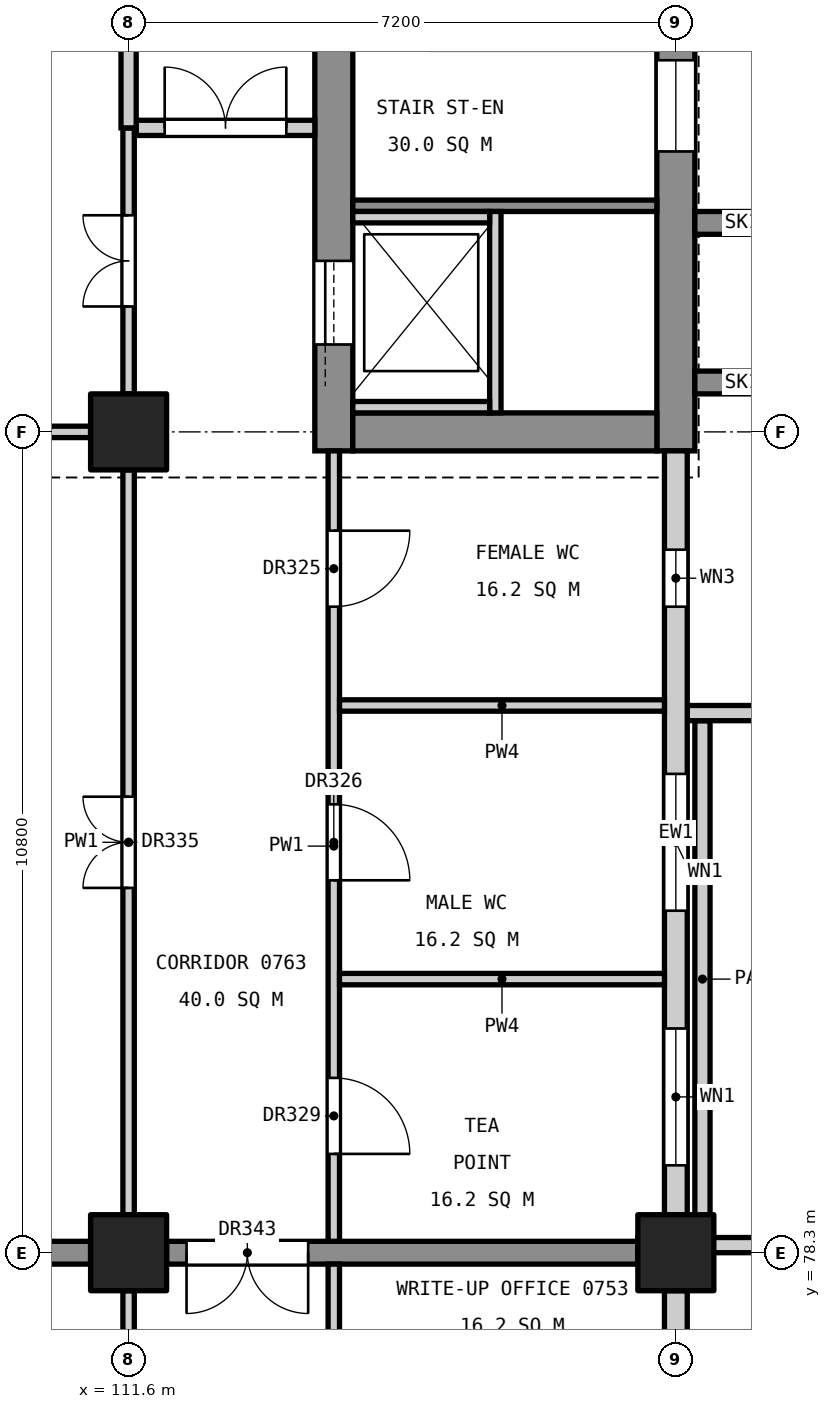
"""IFC4 building model, lengths in metres.
Left out: names, types, materials, properties, quantities, classifications, styles, units other than length and angle.
Written with IfcOpenShell. Run it as: python <this file> out.ifc"""

import sys

from ifc_helpers import new_model, si_unit, direction, frame, frame_2d, origin, origin_2d, place, context, subcontext, project, spatial, rectangle, extrude, element, fill, save


model = new_model("IFC4")
c1 = context("Model", 3, precision=1e-05, world=origin(), true_north=direction((0.0, 1.0)))
c2 = subcontext(c1, "Body", "Model", "MODEL_VIEW")
j1 = project(units=[si_unit("LENGTHUNIT", "METRE"), si_unit("PLANEANGLEUNIT", "RADIAN")], contexts=[c1])
p1 = place(None, origin())
s1 = spatial("IfcSite", under=j1, at=p1, CompositionType="ELEMENT")
p2 = place(p1, origin())
s2 = spatial("IfcBuilding", under=s1, at=p2, CompositionType="ELEMENT")
p3 = place(p2, frame((0.0, 0.0, 36.6)))
s3 = spatial("IfcBuildingStorey", under=s2, at=p3, CompositionType="ELEMENT", Elevation=36.6)
for number, where, z_axis, x_axis in (
    (1, (118.8, 78.3, 0.0), (0.0, 0.0, 1.0), (1.0, 0.0, 0.0)),
    (2, (111.6, 78.3, 0.0), (0.0, 0.0, 1.0), (1.0, 0.0, 0.0)),
    (3, (111.6, 89.1, 0.0), (0.0, 0.0, 1.0), (1.0, 0.0, 0.0)),
):
    element("IfcColumn", number, at=place(p3, frame(where, z_axis=z_axis, x_axis=x_axis)), inside=s3, PredefinedType="COLUMN", context=c2, shape_type="SweptSolid", body=[
        extrude(rectangle(XDim=1.0, YDim=1.0, at=origin_2d()), origin(), (0.0, 0.0, 1.0), 4.8),
    ])
p4 = place(p3, frame((118.8, 88.85, 0.0), z_axis=(0.0, 0.0, 1.0), x_axis=(0.0, 1.0, 0.0)))
e4 = element("IfcWall", 4, at=p4, inside=s3, PredefinedType="SHEAR", context=c2, shape_type="SweptSolid", body=[
    extrude(rectangle(XDim=11.3, YDim=0.5, at=frame_2d((5.65, 0.0))), origin(), (0.0, 0.0, 1.0), 4.55),
])
p5 = place(p4, frame((3.94, 0.0, 3.4)))
e5 = element("IfcOpeningElement", 5, at=p5, cuts=e4, PredefinedType="OPENING", context=c2, shape_type="SweptSolid", body=[
    extrude(rectangle(XDim=1.2, YDim=0.9, at=frame_2d((0.6, 0.45))), frame((0.0, 0.26, 0.0), z_axis=(0.0, -1.0, 0.0), x_axis=(1.0, 0.0, 0.0)), (0.0, 0.0, 1.0), 0.52),
])
p6 = place(p3, frame((114.3, 88.85, 0.0), z_axis=(0.0, 0.0, 1.0), x_axis=(0.0, 1.0, 0.0)))
e6 = element("IfcWall", 6, at=p6, inside=s3, PredefinedType="SHEAR", context=c2, shape_type="SweptSolid", body=[
    extrude(rectangle(XDim=11.3, YDim=0.5, at=frame_2d((5.65, 0.0))), origin(), (0.0, 0.0, 1.0), 4.55),
])
p7 = place(p6, frame((9.35, 0.0, 0.0)))
e7 = element("IfcOpeningElement", 7, at=p7, cuts=e6, PredefinedType="OPENING", context=c2, shape_type="SweptSolid", body=[
    extrude(rectangle(XDim=1.4, YDim=2.1, at=frame_2d((0.7, 1.05))), frame((0.0, 0.26, 0.0), z_axis=(0.0, -1.0, 0.0), x_axis=(1.0, 0.0, 0.0)), (0.0, 0.0, 1.0), 0.52),
])
p8 = place(p6, frame((1.4, 0.0, 0.0)))
e8 = element("IfcOpeningElement", 8, at=p8, cuts=e6, PredefinedType="OPENING", context=c2, shape_type="SweptSolid", body=[
    extrude(rectangle(XDim=1.1, YDim=2.1, at=frame_2d((0.55, 1.05))), frame((0.0, 0.26, 0.0), z_axis=(0.0, -1.0, 0.0), x_axis=(1.0, 0.0, 0.0)), (0.0, 0.0, 1.0), 0.52),
])
p9 = place(p3, frame((118.55, 89.1, 0.0), z_axis=(0.0, 0.0, 1.0), x_axis=(-1.0, 0.0, 0.0)))
e9 = element("IfcWall", 9, at=p9, inside=s3, PredefinedType="SHEAR", context=c2, shape_type="SweptSolid", body=[
    extrude(rectangle(XDim=4.0, YDim=0.5, at=frame_2d((2.0, 0.0))), origin(), (0.0, 0.0, 1.0), 4.55),
])
for number, where, z_axis, x_axis in (
    (10, (119.05, 89.75, 0.0), (0.0, 0.0, 1.0), (1.0, 0.0, 0.0)),
    (11, (119.05, 91.85, 0.0), (0.0, 0.0, 1.0), (1.0, 0.0, 0.0)),
):
    element("IfcWall", number, at=place(p3, frame(where, z_axis=z_axis, x_axis=x_axis)), inside=s3, PredefinedType="SHEAR", context=c2, shape_type="SweptSolid", body=[
        extrude(rectangle(XDim=1.25, YDim=0.3, at=frame_2d((0.625, 0.0))), origin(), (0.0, 0.0, 1.0), 4.8),
    ])
p10 = place(p3, frame((118.3, 78.3, 0.0), z_axis=(0.0, 0.0, 1.0), x_axis=(-1.0, 0.0, 0.0)))
e12 = element("IfcWall", 12, at=p10, inside=s3, PredefinedType="SHEAR", context=c2, shape_type="SweptSolid", body=[
    extrude(rectangle(XDim=6.2, YDim=0.3, at=frame_2d((3.1, 0.0))), origin(), (0.0, 0.0, 1.0), 4.55),
])
p11 = place(p10, frame((4.337, 0.0, 0.0)))
e13 = element("IfcOpeningElement", 13, at=p11, cuts=e12, PredefinedType="OPENING", context=c2, shape_type="SweptSolid", body=[
    extrude(rectangle(XDim=1.6, YDim=2.1, at=frame_2d((0.8, 1.05))), frame((0.0, 0.16, 0.0), z_axis=(0.0, -1.0, 0.0), x_axis=(1.0, 0.0, 0.0)), (0.0, 0.0, 1.0), 0.32),
])
p12 = place(p3, frame((111.1, 78.3, 0.0), z_axis=(0.0, 0.0, 1.0), x_axis=(-1.0, 0.0, 0.0)))
e14 = element("IfcWall", 14, at=p12, inside=s3, PredefinedType="SHEAR", context=c2, shape_type="SweptSolid", body=[
    extrude(rectangle(XDim=9.8, YDim=0.3, at=frame_2d((4.9, 0.0))), origin(), (0.0, 0.0, 1.0), 4.55),
])
p13 = place(p3, frame((118.55, 92.075, 0.0), z_axis=(0.0, 0.0, 1.0), x_axis=(-1.0, 0.0, 0.0)))
e15 = element("IfcWall", 15, at=p13, inside=s3, PredefinedType="SOLIDWALL", context=c2, shape_type="SweptSolid", body=[
    extrude(rectangle(XDim=4.0, YDim=0.15, at=frame_2d((2.0, 0.0))), origin(), (0.0, 0.0, 1.0), 4.55),
])
p14 = place(p3, frame((116.425, 92.0, 0.0), z_axis=(0.0, 0.0, 1.0), x_axis=(0.0, -1.0, 0.0)))
e16 = element("IfcWall", 16, at=p14, inside=s3, PredefinedType="SOLIDWALL", context=c2, shape_type="SweptSolid", body=[
    extrude(rectangle(XDim=2.65, YDim=0.15, at=frame_2d((1.325, 0.0))), origin(), (0.0, 0.0, 1.0), 4.8),
])
for number, where, z_axis, x_axis in (
    (17, (116.35, 91.925, 0.0), (0.0, 0.0, 1.0), (-1.0, 0.0, 0.0)),
    (18, (116.35, 89.425, 0.0), (0.0, 0.0, 1.0), (-1.0, 0.0, 0.0)),
):
    element("IfcWall", number, at=place(p3, frame(where, z_axis=z_axis, x_axis=x_axis)), inside=s3, PredefinedType="SOLIDWALL", context=c2, shape_type="SweptSolid", body=[
        extrude(rectangle(XDim=1.8, YDim=0.15, at=frame_2d((0.9, 0.0))), origin(), (0.0, 0.0, 1.0), 4.8),
    ])
p15 = place(p3, frame((123.6, 78.4, 0.0), z_axis=(0.0, 0.0, 1.0), x_axis=(-1.0, 0.0, 0.0)))
e19 = element("IfcWall", 19, at=p15, inside=s3, PredefinedType="PARAPET", context=c2, shape_type="SweptSolid", body=[
    extrude(rectangle(XDim=5.3, YDim=0.2, at=frame_2d((2.65, 0.0))), origin(), (0.0, 0.0, 1.0), 1.2),
])
p16 = place(p3, frame((119.15, 78.5, 0.0), z_axis=(0.0, 0.0, 1.0), x_axis=(0.0, 1.0, 0.0)))
e20 = element("IfcWall", 20, at=p16, inside=s3, PredefinedType="PARAPET", context=c2, shape_type="SweptSolid", body=[
    extrude(rectangle(XDim=6.8, YDim=0.2, at=frame_2d((3.4, 0.0))), origin(), (0.0, 0.0, 1.0), 1.2),
])
p17 = place(p3, frame((118.95, 85.4, 0.0), z_axis=(0.0, 0.0, 1.0), x_axis=(1.0, 0.0, 0.0)))
e21 = element("IfcWall", 21, at=p17, inside=s3, PredefinedType="PARAPET", context=c2, shape_type="SweptSolid", body=[
    extrude(rectangle(XDim=4.65, YDim=0.2, at=frame_2d((2.325, 0.0))), origin(), (0.0, 0.0, 1.0), 1.2),
])
p18 = place(p3, frame((118.8, 74.95, 0.0), z_axis=(0.0, 0.0, 1.0), x_axis=(0.0, 1.0, 0.0)))
e22 = element("IfcWall", 22, at=p18, inside=s3, PredefinedType="STANDARD", context=c2, shape_type="SweptSolid", body=[
    extrude(rectangle(XDim=2.85, YDim=0.3, at=frame_2d((1.425, 0.0))), origin(), (0.0, 0.0, 1.0), 3.65),
])
p19 = place(p18, frame((1.05, 0.0, 0.8)))
e23 = element("IfcOpeningElement", 23, at=p19, cuts=e22, PredefinedType="OPENING", context=c2, shape_type="SweptSolid", body=[
    extrude(rectangle(XDim=0.75, YDim=1.2, at=frame_2d((0.375, 0.6))), frame((0.0, 0.16, 0.0), z_axis=(0.0, -1.0, 0.0), x_axis=(1.0, 0.0, 0.0)), (0.0, 0.0, 1.0), 0.32),
])
p20 = place(p3, frame((118.8, 78.8, 0.0), z_axis=(0.0, 0.0, 1.0), x_axis=(0.0, 1.0, 0.0)))
e24 = element("IfcWall", 24, at=p20, inside=s3, PredefinedType="STANDARD", context=c2, shape_type="SweptSolid", body=[
    extrude(rectangle(XDim=10.05, YDim=0.3, at=frame_2d((5.025, 0.0))), origin(), (0.0, 0.0, 1.0), 3.65),
])
p21 = place(p20, frame((0.65, 0.0, 0.9)))
e25 = element("IfcOpeningElement", 25, at=p21, cuts=e24, PredefinedType="OPENING", context=c2, shape_type="SweptSolid", body=[
    extrude(rectangle(XDim=1.8, YDim=2.4, at=frame_2d((0.9, 1.2))), frame((0.0, 0.16, 0.0), z_axis=(0.0, -1.0, 0.0), x_axis=(1.0, 0.0, 0.0)), (0.0, 0.0, 1.0), 0.32),
])
p22 = place(p20, frame((4.0, 0.0, 0.9)))
e26 = element("IfcOpeningElement", 26, at=p22, cuts=e24, PredefinedType="OPENING", context=c2, shape_type="SweptSolid", body=[
    extrude(rectangle(XDim=1.8, YDim=2.4, at=frame_2d((0.9, 1.2))), frame((0.0, 0.16, 0.0), z_axis=(0.0, -1.0, 0.0), x_axis=(1.0, 0.0, 0.0)), (0.0, 0.0, 1.0), 0.32),
])
p23 = place(p20, frame((8.0, 0.0, 0.8)))
e27 = element("IfcOpeningElement", 27, at=p23, cuts=e24, PredefinedType="OPENING", context=c2, shape_type="SweptSolid", body=[
    extrude(rectangle(XDim=0.75, YDim=1.2, at=frame_2d((0.375, 0.6))), frame((0.0, 0.16, 0.0), z_axis=(0.0, -1.0, 0.0), x_axis=(1.0, 0.0, 0.0)), (0.0, 0.0, 1.0), 0.32),
])
p24 = place(p3, frame((114.3, 74.95, 0.0), z_axis=(0.0, 0.0, 1.0), x_axis=(0.0, 1.0, 0.0)))
e28 = element("IfcWall", 28, at=p24, inside=s3, PredefinedType="PARTITIONING", context=c2, shape_type="SweptSolid", body=[
    extrude(rectangle(XDim=3.2, YDim=0.15, at=frame_2d((1.6, 0.0))), origin(), (0.0, 0.0, 1.0), 3.55),
])
p25 = place(p24, frame((1.05, 0.0, 0.0)))
e29 = element("IfcOpeningElement", 29, at=p25, cuts=e28, PredefinedType="OPENING", context=c2, shape_type="SweptSolid", body=[
    extrude(rectangle(XDim=1.0, YDim=2.1, at=frame_2d((0.5, 1.05))), frame((0.0, 0.085, 0.0), z_axis=(0.0, -1.0, 0.0), x_axis=(1.0, 0.0, 0.0)), (0.0, 0.0, 1.0), 0.17),
])
p26 = place(p3, frame((114.3, 78.45, 0.0), z_axis=(0.0, 0.0, 1.0), x_axis=(0.0, 1.0, 0.0)))
e30 = element("IfcWall", 30, at=p26, inside=s3, PredefinedType="PARTITIONING", context=c2, shape_type="SweptSolid", body=[
    extrude(rectangle(XDim=10.4, YDim=0.15, at=frame_2d((5.2, 0.0))), origin(), (0.0, 0.0, 1.0), 3.55),
])
p27 = place(p26, frame((8.35, 0.0, 0.0)))
e31 = element("IfcOpeningElement", 31, at=p27, cuts=e30, PredefinedType="OPENING", context=c2, shape_type="SweptSolid", body=[
    extrude(rectangle(XDim=1.0, YDim=2.1, at=frame_2d((0.5, 1.05))), frame((0.0, 0.085, 0.0), z_axis=(0.0, -1.0, 0.0), x_axis=(1.0, 0.0, 0.0)), (0.0, 0.0, 1.0), 0.17),
])
p28 = place(p26, frame((4.75, 0.0, 0.0)))
e32 = element("IfcOpeningElement", 32, at=p28, cuts=e30, PredefinedType="OPENING", context=c2, shape_type="SweptSolid", body=[
    extrude(rectangle(XDim=1.0, YDim=2.1, at=frame_2d((0.5, 1.05))), frame((0.0, 0.085, 0.0), z_axis=(0.0, -1.0, 0.0), x_axis=(1.0, 0.0, 0.0)), (0.0, 0.0, 1.0), 0.17),
])
p29 = place(p26, frame((1.15, 0.0, 0.0)))
e33 = element("IfcOpeningElement", 33, at=p29, cuts=e30, PredefinedType="OPENING", context=c2, shape_type="SweptSolid", body=[
    extrude(rectangle(XDim=1.0, YDim=2.1, at=frame_2d((0.5, 1.05))), frame((0.0, 0.085, 0.0), z_axis=(0.0, -1.0, 0.0), x_axis=(1.0, 0.0, 0.0)), (0.0, 0.0, 1.0), 0.17),
])
for number, where, z_axis, x_axis in (
    (34, (118.65, 81.9, 0.0), (0.0, 0.0, 1.0), (-1.0, 0.0, 0.0)),
    (35, (118.65, 85.5, 0.0), (0.0, 0.0, 1.0), (-1.0, 0.0, 0.0)),
):
    element("IfcWall", number, at=place(p3, frame(where, z_axis=z_axis, x_axis=x_axis)), inside=s3, PredefinedType="PARTITIONING", context=c2, shape_type="SweptSolid", body=[
        extrude(rectangle(XDim=4.275, YDim=0.15, at=frame_2d((2.137, 0.0))), origin(), (0.0, 0.0, 1.0), 3.85),
    ])
p30 = place(p3, frame((114.05, 93.1, 0.0), z_axis=(0.0, 0.0, 1.0), x_axis=(-1.0, 0.0, 0.0)))
e36 = element("IfcWall", 36, at=p30, inside=s3, PredefinedType="PARTITIONING", context=c2, shape_type="SweptSolid", body=[
    extrude(rectangle(XDim=2.35, YDim=0.2, at=frame_2d((1.175, 0.0))), origin(), (0.0, 0.0, 1.0), 3.55),
])
p31 = place(p30, frame((0.375, 0.0, 0.0)))
e37 = element("IfcOpeningElement", 37, at=p31, cuts=e36, PredefinedType="OPENING", context=c2, shape_type="SweptSolid", body=[
    extrude(rectangle(XDim=1.6, YDim=2.1, at=frame_2d((0.8, 1.05))), frame((0.0, 0.11, 0.0), z_axis=(0.0, -1.0, 0.0), x_axis=(1.0, 0.0, 0.0)), (0.0, 0.0, 1.0), 0.22),
])
p32 = place(p3, frame((111.6, 70.8, 0.0), z_axis=(0.0, 0.0, 1.0), x_axis=(0.0, 1.0, 0.0)))
e38 = element("IfcWall", 38, at=p32, inside=s3, PredefinedType="PARTITIONING", context=c2, shape_type="SweptSolid", body=[
    extrude(rectangle(XDim=7.0, YDim=0.15, at=frame_2d((3.5, 0.0))), origin(), (0.0, 0.0, 1.0), 3.55),
])
p33 = place(p32, frame((2.9, 0.0, 0.0)))
e39 = element("IfcOpeningElement", 39, at=p33, cuts=e38, PredefinedType="OPENING", context=c2, shape_type="SweptSolid", body=[
    extrude(rectangle(XDim=1.2, YDim=2.1, at=frame_2d((0.6, 1.05))), frame((0.0, 0.085, 0.0), z_axis=(0.0, -1.0, 0.0), x_axis=(1.0, 0.0, 0.0)), (0.0, 0.0, 1.0), 0.17),
])
p34 = place(p3, frame((111.6, 78.8, 0.0), z_axis=(0.0, 0.0, 1.0), x_axis=(0.0, 1.0, 0.0)))
e40 = element("IfcWall", 40, at=p34, inside=s3, PredefinedType="PARTITIONING", context=c2, shape_type="SweptSolid", body=[
    extrude(rectangle(XDim=9.8, YDim=0.15, at=frame_2d((4.9, 0.0))), origin(), (0.0, 0.0, 1.0), 3.55),
])
p35 = place(p34, frame((4.3, 0.0, 0.0)))
e41 = element("IfcOpeningElement", 41, at=p35, cuts=e40, PredefinedType="OPENING", context=c2, shape_type="SweptSolid", body=[
    extrude(rectangle(XDim=1.2, YDim=2.1, at=frame_2d((0.6, 1.05))), frame((0.0, 0.085, 0.0), z_axis=(0.0, -1.0, 0.0), x_axis=(1.0, 0.0, 0.0)), (0.0, 0.0, 1.0), 0.17),
])
p36 = place(p3, frame((111.6, 89.6, 0.0), z_axis=(0.0, 0.0, 1.0), x_axis=(0.0, 1.0, 0.0)))
e42 = element("IfcWall", 42, at=p36, inside=s3, PredefinedType="PARTITIONING", context=c2, shape_type="SweptSolid", body=[
    extrude(rectangle(XDim=3.5, YDim=0.15, at=frame_2d((1.75, 0.0))), origin(), (0.0, 0.0, 1.0), 3.55),
])
p37 = place(p36, frame((1.15, 0.0, 0.0)))
e43 = element("IfcOpeningElement", 43, at=p37, cuts=e42, PredefinedType="OPENING", context=c2, shape_type="SweptSolid", body=[
    extrude(rectangle(XDim=1.2, YDim=2.1, at=frame_2d((0.6, 1.05))), frame((0.0, 0.085, 0.0), z_axis=(0.0, -1.0, 0.0), x_axis=(1.0, 0.0, 0.0)), (0.0, 0.0, 1.0), 0.17),
])
p38 = place(p3, frame((111.6, 93.1, 0.0), z_axis=(0.0, 0.0, 1.0), x_axis=(0.0, 1.0, 0.0)))
e44 = element("IfcWall", 44, at=p38, inside=s3, PredefinedType="PARTITIONING", context=c2, shape_type="SweptSolid", body=[
    extrude(rectangle(XDim=6.3, YDim=0.2, at=frame_2d((3.15, 0.0))), origin(), (0.0, 0.0, 1.0), 3.55),
])
p39 = place(p3, frame((111.1, 89.1, 0.0), z_axis=(0.0, 0.0, 1.0), x_axis=(-1.0, 0.0, 0.0)))
e45 = element("IfcWall", 45, at=p39, inside=s3, PredefinedType="PARTITIONING", context=c2, shape_type="SweptSolid", body=[
    extrude(rectangle(XDim=9.8, YDim=0.15, at=frame_2d((4.9, 0.0))), origin(), (0.0, 0.0, 1.0), 3.85),
])
p40 = place(p8, origin())
e46 = element("IfcDoor", 46, at=p40, inside=s3, OperationType="SLIDING_TO_LEFT", PredefinedType="DOOR", context=c2, shape_type="SweptSolid", body=[
    extrude(rectangle(XDim=1.1, YDim=2.1, at=frame_2d((0.55, 1.05))), frame((0.0, 0.025, 0.0), z_axis=(0.0, -1.0, 0.0), x_axis=(1.0, 0.0, 0.0)), (0.0, 0.0, 1.0), 0.05),
])
fill(e8, e46)
p41 = place(p21, origin())
e47 = element("IfcWindow", 47, at=p41, inside=s3, PartitioningType="SINGLE_PANEL", PredefinedType="WINDOW", context=c2, shape_type="SweptSolid", body=[
    extrude(rectangle(XDim=1.8, YDim=2.4, at=frame_2d((0.9, 1.2))), frame((0.0, 0.03, 0.0), z_axis=(0.0, -1.0, 0.0), x_axis=(1.0, 0.0, 0.0)), (0.0, 0.0, 1.0), 0.06),
])
fill(e25, e47)
p42 = place(p22, origin())
e48 = element("IfcWindow", 48, at=p42, inside=s3, PartitioningType="SINGLE_PANEL", PredefinedType="WINDOW", context=c2, shape_type="SweptSolid", body=[
    extrude(rectangle(XDim=1.8, YDim=2.4, at=frame_2d((0.9, 1.2))), frame((0.0, 0.03, 0.0), z_axis=(0.0, -1.0, 0.0), x_axis=(1.0, 0.0, 0.0)), (0.0, 0.0, 1.0), 0.06),
])
fill(e26, e48)
p43 = place(p23, origin())
e49 = element("IfcWindow", 49, at=p43, inside=s3, PartitioningType="SINGLE_PANEL", PredefinedType="WINDOW", context=c2, shape_type="SweptSolid", body=[
    extrude(rectangle(XDim=0.75, YDim=1.2, at=frame_2d((0.375, 0.6))), frame((0.0, 0.03, 0.0), z_axis=(0.0, -1.0, 0.0), x_axis=(1.0, 0.0, 0.0)), (0.0, 0.0, 1.0), 0.06),
])
fill(e27, e49)
p44 = place(p5, origin())
e50 = element("IfcWindow", 50, at=p44, inside=s3, PartitioningType="SINGLE_PANEL", PredefinedType="WINDOW", context=c2, shape_type="SweptSolid", body=[
    extrude(rectangle(XDim=1.2, YDim=0.9, at=frame_2d((0.6, 0.45))), frame((0.0, 0.03, 0.0), z_axis=(0.0, -1.0, 0.0), x_axis=(1.0, 0.0, 0.0)), (0.0, 0.0, 1.0), 0.06),
])
fill(e5, e50)
p45 = place(p27, frame((1.0, 0.0, 0.0), z_axis=(0.0, 0.0, 1.0), x_axis=(-1.0, 0.0, 0.0)))
e51 = element("IfcDoor", 51, at=p45, inside=s3, OperationType="SINGLE_SWING_LEFT", PredefinedType="DOOR", context=c2, shape_type="SweptSolid", body=[
    extrude(rectangle(XDim=1.0, YDim=2.1, at=frame_2d((0.5, 1.05))), frame((0.0, 0.025, 0.0), z_axis=(0.0, -1.0, 0.0), x_axis=(1.0, 0.0, 0.0)), (0.0, 0.0, 1.0), 0.05),
])
fill(e31, e51)
p46 = place(p28, frame((1.0, 0.0, 0.0), z_axis=(0.0, 0.0, 1.0), x_axis=(-1.0, 0.0, 0.0)))
e52 = element("IfcDoor", 52, at=p46, inside=s3, OperationType="SINGLE_SWING_RIGHT", PredefinedType="DOOR", context=c2, shape_type="SweptSolid", body=[
    extrude(rectangle(XDim=1.0, YDim=2.1, at=frame_2d((0.5, 1.05))), frame((0.0, 0.025, 0.0), z_axis=(0.0, -1.0, 0.0), x_axis=(1.0, 0.0, 0.0)), (0.0, 0.0, 1.0), 0.05),
])
fill(e32, e52)
p47 = place(p29, frame((1.0, 0.0, 0.0), z_axis=(0.0, 0.0, 1.0), x_axis=(-1.0, 0.0, 0.0)))
e53 = element("IfcDoor", 53, at=p47, inside=s3, OperationType="SINGLE_SWING_RIGHT", PredefinedType="DOOR", context=c2, shape_type="SweptSolid", body=[
    extrude(rectangle(XDim=1.0, YDim=2.1, at=frame_2d((0.5, 1.05))), frame((0.0, 0.025, 0.0), z_axis=(0.0, -1.0, 0.0), x_axis=(1.0, 0.0, 0.0)), (0.0, 0.0, 1.0), 0.05),
])
fill(e33, e53)
p48 = place(p35, origin())
e54 = element("IfcDoor", 54, at=p48, inside=s3, OperationType="DOUBLE_DOOR_SINGLE_SWING", PredefinedType="DOOR", context=c2, shape_type="SweptSolid", body=[
    extrude(rectangle(XDim=1.2, YDim=2.1, at=frame_2d((0.6, 1.05))), frame((0.0, 0.025, 0.0), z_axis=(0.0, -1.0, 0.0), x_axis=(1.0, 0.0, 0.0)), (0.0, 0.0, 1.0), 0.05),
])
fill(e41, e54)
p49 = place(p37, origin())
e55 = element("IfcDoor", 55, at=p49, inside=s3, OperationType="DOUBLE_DOOR_SINGLE_SWING", PredefinedType="DOOR", context=c2, shape_type="SweptSolid", body=[
    extrude(rectangle(XDim=1.2, YDim=2.1, at=frame_2d((0.6, 1.05))), frame((0.0, 0.025, 0.0), z_axis=(0.0, -1.0, 0.0), x_axis=(1.0, 0.0, 0.0)), (0.0, 0.0, 1.0), 0.05),
])
fill(e43, e55)
p50 = place(p31, frame((1.6, 0.0, 0.0), z_axis=(0.0, 0.0, 1.0), x_axis=(-1.0, 0.0, 0.0)))
e56 = element("IfcDoor", 56, at=p50, inside=s3, OperationType="DOUBLE_DOOR_SINGLE_SWING", PredefinedType="DOOR", context=c2, shape_type="SweptSolid", body=[
    extrude(rectangle(XDim=1.6, YDim=2.1, at=frame_2d((0.8, 1.05))), frame((0.0, 0.025, 0.0), z_axis=(0.0, -1.0, 0.0), x_axis=(1.0, 0.0, 0.0)), (0.0, 0.0, 1.0), 0.05),
])
fill(e37, e56)
p51 = place(p11, origin())
e57 = element("IfcDoor", 57, at=p51, inside=s3, OperationType="DOUBLE_DOOR_SINGLE_SWING", PredefinedType="DOOR", context=c2, shape_type="SweptSolid", body=[
    extrude(rectangle(XDim=1.6, YDim=2.1, at=frame_2d((0.8, 1.05))), frame((0.0, 0.025, 0.0), z_axis=(0.0, -1.0, 0.0), x_axis=(1.0, 0.0, 0.0)), (0.0, 0.0, 1.0), 0.05),
])
fill(e13, e57)
save(model, sys.argv[1])
